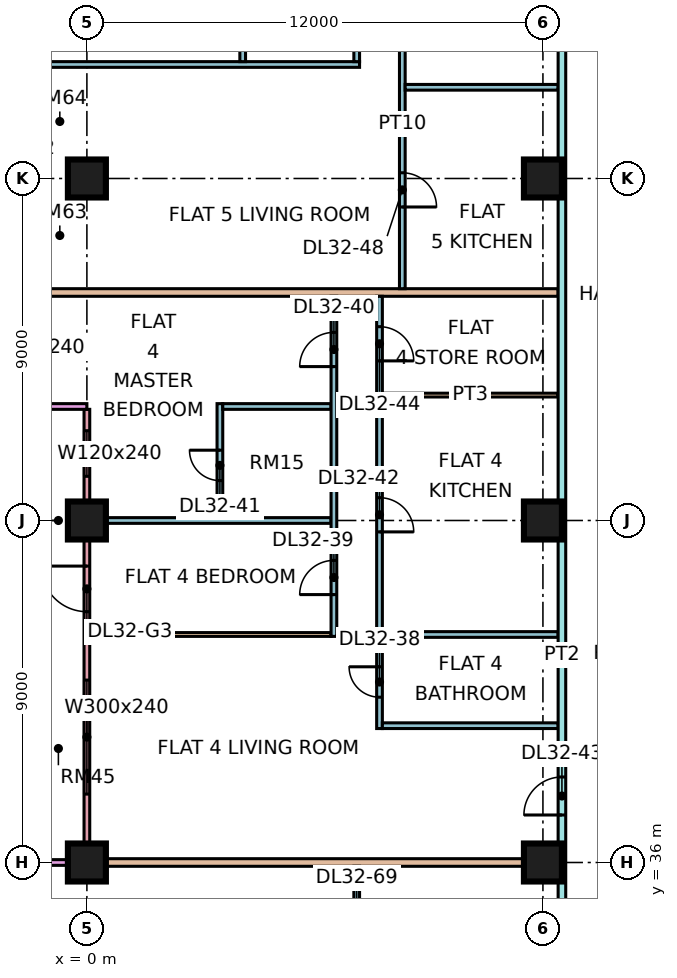
"""IFC4 building model, lengths in metres.
Left out: names, types, materials, properties, quantities, classifications, styles, units other than length and angle.
Written with IfcOpenShell. Run it as: python <this file> out.ifc"""

import sys

from ifc_helpers import new_model, si_unit, direction, frame, frame_2d, origin, origin_2d, place, context, subcontext, project, spatial, rectangle, extrude, element, fill, save


model = new_model("IFC4")
c1 = context("Model", 3, precision=1e-05, world=origin(), true_north=direction((0.0, 1.0)))
c2 = subcontext(c1, "Body", "Model", "MODEL_VIEW")
j1 = project(units=[si_unit("LENGTHUNIT", "METRE"), si_unit("PLANEANGLEUNIT", "RADIAN")], contexts=[c1])
p1 = place(None, origin())
s1 = spatial("IfcSite", under=j1, at=p1, CompositionType="ELEMENT")
p2 = place(p1, origin())
s2 = spatial("IfcBuilding", under=s1, at=p2, CompositionType="ELEMENT")
p3 = place(p2, frame((0.0, 0.0, 136.9)))
s3 = spatial("IfcBuildingStorey", under=s2, at=p3, CompositionType="ELEMENT", Elevation=136.9)
p4 = place(p3, frame((0.0, 36.0, 0.0), z_axis=(0.0, 0.0, 1.0), x_axis=(1.0, 0.0, 0.0)))
e1 = element("IfcColumn", 1, at=p4, inside=s3, PredefinedType="COLUMN", context=c2, shape_type="SweptSolid", body=[
    extrude(rectangle(XDim=1.0, YDim=1.0, at=origin_2d()), origin(), (0.0, 0.0, 1.0), 3.75),
])
for number, where, z_axis, x_axis in (
    (2, (0.0, 45.0, 0.0), (0.0, 0.0, 1.0), (1.0, 0.0, 0.0)),
    (3, (0.0, 54.0, 0.0), (0.0, 0.0, 1.0), (1.0, 0.0, 0.0)),
    (4, (12.0, 36.0, 0.0), (0.0, 0.0, 1.0), (1.0, 0.0, 0.0)),
    (5, (12.0, 45.0, 0.0), (0.0, 0.0, 1.0), (1.0, 0.0, 0.0)),
    (6, (12.0, 54.0, 0.0), (0.0, 0.0, 1.0), (1.0, 0.0, 0.0)),
):
    element("IfcColumn", number, at=place(p3, frame(where, z_axis=z_axis, x_axis=x_axis)), inside=s3, PredefinedType="COLUMN", context=c2, shape_type="SweptSolid", body=[
        extrude(rectangle(XDim=1.0, YDim=1.0, at=origin_2d()), origin(), (0.0, 0.0, 1.0), 3.75),
    ])
p5 = place(p3, frame((0.0, 47.925, 0.0), z_axis=(0.0, 0.0, 1.0), x_axis=(0.0, -1.0, 0.0)))
e7 = element("IfcWall", 7, at=p5, inside=s3, PredefinedType="SOLIDWALL", context=c2, shape_type="SweptSolid", body=[
    extrude(rectangle(XDim=11.85, YDim=0.15, at=frame_2d((5.925, 0.0))), origin(), (0.0, 0.0, 1.0), 3.3),
])
p6 = place(p5, frame((0.562, 0.0, 0.45)))
e8 = element("IfcOpeningElement", 8, at=p6, cuts=e7, PredefinedType="OPENING", context=c2, shape_type="SweptSolid", body=[
    extrude(rectangle(XDim=1.2, YDim=2.4, at=frame_2d((0.6, 1.2))), frame((0.0, 0.085, 0.0), z_axis=(0.0, -1.0, 0.0), x_axis=(1.0, 0.0, 0.0)), (0.0, 0.0, 1.0), 0.17),
])
p7 = place(p5, frame((4.125, 0.0, 0.0)))
e9 = element("IfcOpeningElement", 9, at=p7, cuts=e7, PredefinedType="OPENING", context=c2, shape_type="SweptSolid", body=[
    extrude(rectangle(XDim=1.2, YDim=2.4, at=frame_2d((0.6, 1.2))), frame((0.0, 0.085, 0.0), z_axis=(0.0, -1.0, 0.0), x_axis=(1.0, 0.0, 0.0)), (0.0, 0.0, 1.0), 0.17),
])
p8 = place(p5, frame((7.125, 0.0, 0.45)))
e10 = element("IfcOpeningElement", 10, at=p8, cuts=e7, PredefinedType="OPENING", context=c2, shape_type="SweptSolid", body=[
    extrude(rectangle(XDim=3.0, YDim=2.4, at=frame_2d((1.5, 1.2))), frame((0.0, 0.085, 0.0), z_axis=(0.0, -1.0, 0.0), x_axis=(1.0, 0.0, 0.0)), (0.0, 0.0, 1.0), 0.17),
])
for number, where, z_axis, x_axis in (
    (11, (-1.5, 48.0, 0.0), (0.0, 0.0, 1.0), (1.0, 0.0, 0.0)),
    (12, (-1.5, 36.0, 0.0), (0.0, 0.0, 1.0), (1.0, 0.0, 0.0)),
):
    element("IfcWall", number, at=place(p3, frame(where, z_axis=z_axis, x_axis=x_axis)), inside=s3, PredefinedType="SOLIDWALL", context=c2, shape_type="SweptSolid", body=[
        extrude(rectangle(XDim=1.5, YDim=0.15, at=frame_2d((0.75, 0.0))), origin(), (0.0, 0.0, 1.0), 3.3),
    ])
e13 = element("IfcWall", 13, at=p4, inside=s3, PredefinedType="PARTITIONING", context=c2, shape_type="SweptSolid", body=[
    extrude(rectangle(XDim=12.4, YDim=0.2, at=frame_2d((6.2, 0.0))), origin(), (0.0, 0.0, 1.0), 3.3),
])
p9 = place(p3, frame((-1.35, 51.0, 0.0), z_axis=(0.0, 0.0, 1.0), x_axis=(1.0, 0.0, 0.0)))
e14 = element("IfcWall", 14, at=p9, inside=s3, PredefinedType="PARTITIONING", context=c2, shape_type="SweptSolid", body=[
    extrude(rectangle(XDim=13.75, YDim=0.2, at=frame_2d((6.875, 0.0))), origin(), (0.0, 0.0, 1.0), 3.3),
])
p10 = place(p3, frame((-1.35, 57.0, 0.0), z_axis=(0.0, 0.0, 1.0), x_axis=(1.0, 0.0, 0.0)))
e15 = element("IfcWall", 15, at=p10, inside=s3, PredefinedType="PARTITIONING", context=c2, shape_type="SweptSolid", body=[
    extrude(rectangle(XDim=8.525, YDim=0.15, at=frame_2d((4.263, 0.0))), origin(), (0.0, 0.0, 1.0), 3.3),
])
p11 = place(p3, frame((0.074, 42.0, 0.0), z_axis=(0.0, 0.0, 1.0), x_axis=(1.0, 0.0, 0.0)))
e16 = element("IfcWall", 16, at=p11, inside=s3, PredefinedType="PARTITIONING", context=c2, shape_type="SweptSolid", body=[
    extrude(rectangle(XDim=6.351, YDim=0.1, at=frame_2d((3.176, 0.0))), origin(), (0.0, 0.0, 1.0), 3.3),
])
p12 = place(p3, frame((0.074, 45.0, 0.0), z_axis=(0.0, 0.0, 1.0), x_axis=(1.0, 0.0, 0.0)))
e17 = element("IfcWall", 17, at=p12, inside=s3, PredefinedType="PARTITIONING", context=c2, shape_type="SweptSolid", body=[
    extrude(rectangle(XDim=6.351, YDim=0.15, at=frame_2d((3.176, 0.0))), origin(), (0.0, 0.0, 1.0), 3.3),
])
p13 = place(p3, frame((3.5, 45.075, 0.0), z_axis=(0.0, 0.0, 1.0), x_axis=(0.0, 1.0, 0.0)))
e18 = element("IfcWall", 18, at=p13, inside=s3, PredefinedType="PARTITIONING", context=c2, shape_type="SweptSolid", body=[
    extrude(rectangle(XDim=3.0, YDim=0.15, at=frame_2d((1.5, 0.0))), origin(), (0.0, 0.0, 1.0), 3.3),
])
p14 = place(p13, frame((0.975, 0.0, 0.0)))
e19 = element("IfcOpeningElement", 19, at=p14, cuts=e18, PredefinedType="OPENING", context=c2, shape_type="SweptSolid", body=[
    extrude(rectangle(XDim=0.8, YDim=2.1, at=frame_2d((0.4, 1.05))), frame((0.0, 0.085, 0.0), z_axis=(0.0, -1.0, 0.0), x_axis=(1.0, 0.0, 0.0)), (0.0, 0.0, 1.0), 0.17),
])
p15 = place(p3, frame((3.575, 48.0, 0.0), z_axis=(0.0, 0.0, 1.0), x_axis=(1.0, 0.0, 0.0)))
e20 = element("IfcWall", 20, at=p15, inside=s3, PredefinedType="PARTITIONING", context=c2, shape_type="SweptSolid", body=[
    extrude(rectangle(XDim=2.85, YDim=0.15, at=frame_2d((1.425, 0.0))), origin(), (0.0, 0.0, 1.0), 3.3),
])
p16 = place(p3, frame((4.1, 57.075, 0.0), z_axis=(0.0, 0.0, 1.0), x_axis=(0.0, 1.0, 0.0)))
e21 = element("IfcWall", 21, at=p16, inside=s3, PredefinedType="PARTITIONING", context=c2, shape_type="SweptSolid", body=[
    extrude(rectangle(XDim=3.0, YDim=0.15, at=frame_2d((1.5, 0.0))), origin(), (0.0, 0.0, 1.0), 3.3),
])
p17 = place(p3, frame((6.5, 41.95, 0.0), z_axis=(0.0, 0.0, 1.0), x_axis=(0.0, 1.0, 0.0)))
e22 = element("IfcWall", 22, at=p17, inside=s3, PredefinedType="PARTITIONING", context=c2, shape_type="SweptSolid", body=[
    extrude(rectangle(XDim=8.95, YDim=0.15, at=frame_2d((4.475, 0.0))), origin(), (0.0, 0.0, 1.0), 3.3),
])
p18 = place(p17, frame((1.1, 0.0, 0.0)))
e23 = element("IfcOpeningElement", 23, at=p18, cuts=e22, PredefinedType="OPENING", context=c2, shape_type="SweptSolid", body=[
    extrude(rectangle(XDim=0.9, YDim=2.1, at=frame_2d((0.45, 1.05))), frame((0.0, 0.085, 0.0), z_axis=(0.0, -1.0, 0.0), x_axis=(1.0, 0.0, 0.0)), (0.0, 0.0, 1.0), 0.17),
])
p19 = place(p17, frame((7.1, 0.0, 0.0)))
e24 = element("IfcOpeningElement", 24, at=p19, cuts=e22, PredefinedType="OPENING", context=c2, shape_type="SweptSolid", body=[
    extrude(rectangle(XDim=0.9, YDim=2.1, at=frame_2d((0.45, 1.05))), frame((0.0, 0.085, 0.0), z_axis=(0.0, -1.0, 0.0), x_axis=(1.0, 0.0, 0.0)), (0.0, 0.0, 1.0), 0.17),
])
p20 = place(p3, frame((7.1, 26.925, 0.0), z_axis=(0.0, 0.0, 1.0), x_axis=(0.0, 1.0, 0.0)))
e25 = element("IfcWall", 25, at=p20, inside=s3, PredefinedType="PARTITIONING", context=c2, shape_type="SweptSolid", body=[
    extrude(rectangle(XDim=8.975, YDim=0.15, at=frame_2d((4.487, 0.0))), origin(), (0.0, 0.0, 1.0), 3.3),
])
p21 = place(p20, frame((7.125, 0.0, 0.0)))
e26 = element("IfcOpeningElement", 26, at=p21, cuts=e25, PredefinedType="OPENING", context=c2, shape_type="SweptSolid", body=[
    extrude(rectangle(XDim=0.9, YDim=2.1, at=frame_2d((0.45, 1.05))), frame((0.0, 0.085, 0.0), z_axis=(0.0, -1.0, 0.0), x_axis=(1.0, 0.0, 0.0)), (0.0, 0.0, 1.0), 0.17),
])
p22 = place(p20, frame((4.125, 0.0, 0.0)))
e27 = element("IfcOpeningElement", 27, at=p22, cuts=e25, PredefinedType="OPENING", context=c2, shape_type="SweptSolid", body=[
    extrude(rectangle(XDim=0.9, YDim=2.1, at=frame_2d((0.45, 1.05))), frame((0.0, 0.085, 0.0), z_axis=(0.0, -1.0, 0.0), x_axis=(1.0, 0.0, 0.0)), (0.0, 0.0, 1.0), 0.17),
])
p23 = place(p3, frame((7.1, 57.075, 0.0), z_axis=(0.0, 0.0, 1.0), x_axis=(0.0, 1.0, 0.0)))
e28 = element("IfcWall", 28, at=p23, inside=s3, PredefinedType="PARTITIONING", context=c2, shape_type="SweptSolid", body=[
    extrude(rectangle(XDim=7.275, YDim=0.15, at=frame_2d((3.638, 0.0))), origin(), (0.0, 0.0, 1.0), 3.3),
])
p24 = place(p23, frame((3.975, 0.0, 0.0)))
e29 = element("IfcOpeningElement", 29, at=p24, cuts=e28, PredefinedType="OPENING", context=c2, shape_type="SweptSolid", body=[
    extrude(rectangle(XDim=0.9, YDim=2.1, at=frame_2d((0.45, 1.05))), frame((0.0, 0.085, 0.0), z_axis=(0.0, -1.0, 0.0), x_axis=(1.0, 0.0, 0.0)), (0.0, 0.0, 1.0), 0.17),
])
p25 = place(p3, frame((7.7, 39.525, 0.0), z_axis=(0.0, 0.0, 1.0), x_axis=(0.0, 1.0, 0.0)))
e30 = element("IfcWall", 30, at=p25, inside=s3, PredefinedType="PARTITIONING", context=c2, shape_type="SweptSolid", body=[
    extrude(rectangle(XDim=11.375, YDim=0.15, at=frame_2d((5.688, 0.0))), origin(), (0.0, 0.0, 1.0), 3.3),
])
p26 = place(p25, frame((0.825, 0.0, 0.0)))
e31 = element("IfcOpeningElement", 31, at=p26, cuts=e30, PredefinedType="OPENING", context=c2, shape_type="SweptSolid", body=[
    extrude(rectangle(XDim=0.8, YDim=2.1, at=frame_2d((0.4, 1.05))), frame((0.0, 0.085, 0.0), z_axis=(0.0, -1.0, 0.0), x_axis=(1.0, 0.0, 0.0)), (0.0, 0.0, 1.0), 0.17),
])
p27 = place(p25, frame((5.175, 0.0, 0.0)))
e32 = element("IfcOpeningElement", 32, at=p27, cuts=e30, PredefinedType="OPENING", context=c2, shape_type="SweptSolid", body=[
    extrude(rectangle(XDim=0.9, YDim=2.1, at=frame_2d((0.45, 1.05))), frame((0.0, 0.085, 0.0), z_axis=(0.0, -1.0, 0.0), x_axis=(1.0, 0.0, 0.0)), (0.0, 0.0, 1.0), 0.17),
])
p28 = place(p25, frame((9.675, 0.0, 0.0)))
e33 = element("IfcOpeningElement", 33, at=p28, cuts=e30, PredefinedType="OPENING", context=c2, shape_type="SweptSolid", body=[
    extrude(rectangle(XDim=0.9, YDim=2.1, at=frame_2d((0.45, 1.05))), frame((0.0, 0.085, 0.0), z_axis=(0.0, -1.0, 0.0), x_axis=(1.0, 0.0, 0.0)), (0.0, 0.0, 1.0), 0.17),
])
for number, where, z_axis, x_axis in (
    (34, (7.775, 39.6, 0.0), (0.0, 0.0, 1.0), (1.0, 0.0, 0.0)),
    (35, (7.775, 42.0, 0.0), (0.0, 0.0, 1.0), (1.0, 0.0, 0.0)),
):
    element("IfcWall", number, at=place(p3, frame(where, z_axis=z_axis, x_axis=x_axis)), inside=s3, PredefinedType="PARTITIONING", context=c2, shape_type="SweptSolid", body=[
        extrude(rectangle(XDim=4.625, YDim=0.15, at=frame_2d((2.312, 0.0))), origin(), (0.0, 0.0, 1.0), 3.3),
    ])
p29 = place(p3, frame((7.775, 48.3, 0.0), z_axis=(0.0, 0.0, 1.0), x_axis=(1.0, 0.0, 0.0)))
e36 = element("IfcWall", 36, at=p29, inside=s3, PredefinedType="PARTITIONING", context=c2, shape_type="SweptSolid", body=[
    extrude(rectangle(XDim=4.625, YDim=0.1, at=frame_2d((2.312, 0.0))), origin(), (0.0, 0.0, 1.0), 3.3),
])
p30 = place(p3, frame((8.3, 51.1, 0.0), z_axis=(0.0, 0.0, 1.0), x_axis=(0.0, 1.0, 0.0)))
e37 = element("IfcWall", 37, at=p30, inside=s3, PredefinedType="PARTITIONING", context=c2, shape_type="SweptSolid", body=[
    extrude(rectangle(XDim=8.675, YDim=0.15, at=frame_2d((4.337, 0.0))), origin(), (0.0, 0.0, 1.0), 3.3),
])
p31 = place(p30, frame((2.15, 0.0, 0.0)))
e38 = element("IfcOpeningElement", 38, at=p31, cuts=e37, PredefinedType="OPENING", context=c2, shape_type="SweptSolid", body=[
    extrude(rectangle(XDim=0.9, YDim=2.1, at=frame_2d((0.45, 1.05))), frame((0.0, 0.085, 0.0), z_axis=(0.0, -1.0, 0.0), x_axis=(1.0, 0.0, 0.0)), (0.0, 0.0, 1.0), 0.17),
])
p32 = place(p3, frame((8.375, 56.4, 0.0), z_axis=(0.0, 0.0, 1.0), x_axis=(1.0, 0.0, 0.0)))
e39 = element("IfcWall", 39, at=p32, inside=s3, PredefinedType="PARTITIONING", context=c2, shape_type="SweptSolid", body=[
    extrude(rectangle(XDim=4.025, YDim=0.15, at=frame_2d((2.012, 0.0))), origin(), (0.0, 0.0, 1.0), 3.3),
])
p33 = place(p3, frame((12.5, 20.0, 0.0), z_axis=(0.0, 0.0, 1.0), x_axis=(0.0, 1.0, 0.0)))
e40 = element("IfcWall", 40, at=p33, inside=s3, PredefinedType="PARTITIONING", context=c2, shape_type="SweptSolid", body=[
    extrude(rectangle(XDim=42.926, YDim=0.2, at=frame_2d((21.463, 0.0))), origin(), (0.0, 0.0, 1.0), 3.3),
])
p34 = place(p33, frame((17.25, 0.0, 0.0)))
e41 = element("IfcOpeningElement", 41, at=p34, cuts=e40, PredefinedType="OPENING", context=c2, shape_type="SweptSolid", body=[
    extrude(rectangle(XDim=1.0, YDim=2.1, at=frame_2d((0.5, 1.05))), frame((0.0, 0.11, 0.0), z_axis=(0.0, -1.0, 0.0), x_axis=(1.0, 0.0, 0.0)), (0.0, 0.0, 1.0), 0.22),
])
p35 = place(p33, frame((40.8, 0.0, 0.0)))
e42 = element("IfcOpeningElement", 42, at=p35, cuts=e40, PredefinedType="OPENING", context=c2, shape_type="SweptSolid", body=[
    extrude(rectangle(XDim=1.0, YDim=2.1, at=frame_2d((0.5, 1.05))), frame((0.0, 0.11, 0.0), z_axis=(0.0, -1.0, 0.0), x_axis=(1.0, 0.0, 0.0)), (0.0, 0.0, 1.0), 0.22),
])
p36 = place(p33, frame((0.6, 0.0, 0.0)))
e43 = element("IfcOpeningElement", 43, at=p36, cuts=e40, PredefinedType="OPENING", context=c2, shape_type="SweptSolid", body=[
    extrude(rectangle(XDim=1.2, YDim=2.1, at=frame_2d((0.6, 1.05))), frame((0.0, 0.11, 0.0), z_axis=(0.0, -1.0, 0.0), x_axis=(1.0, 0.0, 0.0)), (0.0, 0.0, 1.0), 0.22),
])
p37 = place(p33, frame((13.65, 0.0, 0.0)))
e44 = element("IfcOpeningElement", 44, at=p37, cuts=e40, PredefinedType="OPENING", context=c2, shape_type="SweptSolid", body=[
    extrude(rectangle(XDim=1.0, YDim=2.1, at=frame_2d((0.5, 1.05))), frame((0.0, 0.11, 0.0), z_axis=(0.0, -1.0, 0.0), x_axis=(1.0, 0.0, 0.0)), (0.0, 0.0, 1.0), 0.22),
])
p38 = place(p6, origin())
e45 = element("IfcWindow", 45, at=p38, inside=s3, PartitioningType="SINGLE_PANEL", PredefinedType="WINDOW", context=c2, shape_type="SweptSolid", body=[
    extrude(rectangle(XDim=1.2, YDim=2.4, at=frame_2d((0.6, 1.2))), frame((0.0, 0.03, 0.0), z_axis=(0.0, -1.0, 0.0), x_axis=(1.0, 0.0, 0.0)), (0.0, 0.0, 1.0), 0.06),
])
fill(e8, e45)
p39 = place(p7, frame((1.2, 0.0, 0.0), z_axis=(0.0, 0.0, 1.0), x_axis=(-1.0, 0.0, 0.0)))
e46 = element("IfcDoor", 46, at=p39, inside=s3, OperationType="DOUBLE_DOOR_SINGLE_SWING", PredefinedType="DOOR", context=c2, shape_type="SweptSolid", body=[
    extrude(rectangle(XDim=1.2, YDim=2.4, at=frame_2d((0.6, 1.2))), frame((0.0, 0.025, 0.0), z_axis=(0.0, -1.0, 0.0), x_axis=(1.0, 0.0, 0.0)), (0.0, 0.0, 1.0), 0.05),
])
fill(e9, e46)
p40 = place(p8, origin())
e47 = element("IfcWindow", 47, at=p40, inside=s3, PartitioningType="SINGLE_PANEL", PredefinedType="WINDOW", context=c2, shape_type="SweptSolid", body=[
    extrude(rectangle(XDim=3.0, YDim=2.4, at=frame_2d((1.5, 1.2))), frame((0.0, 0.03, 0.0), z_axis=(0.0, -1.0, 0.0), x_axis=(1.0, 0.0, 0.0)), (0.0, 0.0, 1.0), 0.06),
])
fill(e10, e47)
p41 = place(p26, frame((0.8, 0.0, 0.0), z_axis=(0.0, 0.0, 1.0), x_axis=(-1.0, 0.0, 0.0)))
e48 = element("IfcDoor", 48, at=p41, inside=s3, OperationType="SINGLE_SWING_RIGHT", PredefinedType="DOOR", context=c2, shape_type="SweptSolid", body=[
    extrude(rectangle(XDim=0.8, YDim=2.1, at=frame_2d((0.4, 1.05))), frame((0.0, 0.025, 0.0), z_axis=(0.0, -1.0, 0.0), x_axis=(1.0, 0.0, 0.0)), (0.0, 0.0, 1.0), 0.05),
])
fill(e31, e48)
p42 = place(p18, origin())
e49 = element("IfcDoor", 49, at=p42, inside=s3, OperationType="SINGLE_SWING_LEFT", PredefinedType="DOOR", context=c2, shape_type="SweptSolid", body=[
    extrude(rectangle(XDim=0.9, YDim=2.1, at=frame_2d((0.45, 1.05))), frame((0.0, 0.025, 0.0), z_axis=(0.0, -1.0, 0.0), x_axis=(1.0, 0.0, 0.0)), (0.0, 0.0, 1.0), 0.05),
])
fill(e23, e49)
p43 = place(p19, origin())
e50 = element("IfcDoor", 50, at=p43, inside=s3, OperationType="SINGLE_SWING_LEFT", PredefinedType="DOOR", context=c2, shape_type="SweptSolid", body=[
    extrude(rectangle(XDim=0.9, YDim=2.1, at=frame_2d((0.45, 1.05))), frame((0.0, 0.025, 0.0), z_axis=(0.0, -1.0, 0.0), x_axis=(1.0, 0.0, 0.0)), (0.0, 0.0, 1.0), 0.05),
])
fill(e24, e50)
p44 = place(p14, frame((0.8, 0.0, 0.0), z_axis=(0.0, 0.0, 1.0), x_axis=(-1.0, 0.0, 0.0)))
e51 = element("IfcDoor", 51, at=p44, inside=s3, OperationType="SINGLE_SWING_RIGHT", PredefinedType="DOOR", context=c2, shape_type="SweptSolid", body=[
    extrude(rectangle(XDim=0.8, YDim=2.1, at=frame_2d((0.4, 1.05))), frame((0.0, 0.025, 0.0), z_axis=(0.0, -1.0, 0.0), x_axis=(1.0, 0.0, 0.0)), (0.0, 0.0, 1.0), 0.05),
])
fill(e19, e51)
p45 = place(p27, frame((0.9, 0.0, 0.0), z_axis=(0.0, 0.0, 1.0), x_axis=(-1.0, 0.0, 0.0)))
e52 = element("IfcDoor", 52, at=p45, inside=s3, OperationType="SINGLE_SWING_LEFT", PredefinedType="DOOR", context=c2, shape_type="SweptSolid", body=[
    extrude(rectangle(XDim=0.9, YDim=2.1, at=frame_2d((0.45, 1.05))), frame((0.0, 0.025, 0.0), z_axis=(0.0, -1.0, 0.0), x_axis=(1.0, 0.0, 0.0)), (0.0, 0.0, 1.0), 0.05),
])
fill(e32, e52)
p46 = place(p34, origin())
e53 = element("IfcDoor", 53, at=p46, inside=s3, OperationType="SINGLE_SWING_LEFT", PredefinedType="DOOR", context=c2, shape_type="SweptSolid", body=[
    extrude(rectangle(XDim=1.0, YDim=2.1, at=frame_2d((0.5, 1.05))), frame((0.0, 0.025, 0.0), z_axis=(0.0, -1.0, 0.0), x_axis=(1.0, 0.0, 0.0)), (0.0, 0.0, 1.0), 0.05),
])
fill(e41, e53)
p47 = place(p28, frame((0.9, 0.0, 0.0), z_axis=(0.0, 0.0, 1.0), x_axis=(-1.0, 0.0, 0.0)))
e54 = element("IfcDoor", 54, at=p47, inside=s3, OperationType="SINGLE_SWING_LEFT", PredefinedType="DOOR", context=c2, shape_type="SweptSolid", body=[
    extrude(rectangle(XDim=0.9, YDim=2.1, at=frame_2d((0.45, 1.05))), frame((0.0, 0.025, 0.0), z_axis=(0.0, -1.0, 0.0), x_axis=(1.0, 0.0, 0.0)), (0.0, 0.0, 1.0), 0.05),
])
fill(e33, e54)
p48 = place(p31, frame((0.9, 0.0, 0.0), z_axis=(0.0, 0.0, 1.0), x_axis=(-1.0, 0.0, 0.0)))
e55 = element("IfcDoor", 55, at=p48, inside=s3, OperationType="SINGLE_SWING_LEFT", PredefinedType="DOOR", context=c2, shape_type="SweptSolid", body=[
    extrude(rectangle(XDim=0.9, YDim=2.1, at=frame_2d((0.45, 1.05))), frame((0.0, 0.025, 0.0), z_axis=(0.0, -1.0, 0.0), x_axis=(1.0, 0.0, 0.0)), (0.0, 0.0, 1.0), 0.05),
])
fill(e38, e55)
save(model, sys.argv[1])
